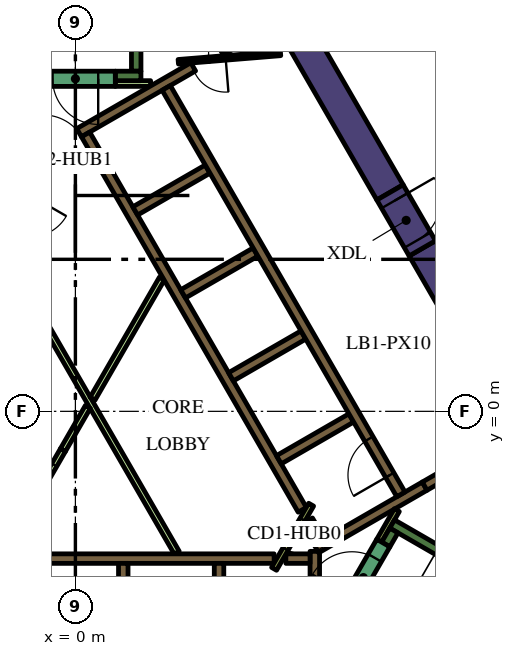
"""IFC4 building model, lengths in metres.
Left out: names, types, materials, properties, quantities, classifications, styles, units other than length and angle.
Written with IfcOpenShell. Run it as: python <this file> out.ifc"""

import sys

from ifc_helpers import new_model, si_unit, direction, frame, frame_2d, origin, place, context, subcontext, project, spatial, rectangle, extrude, element, fill, save


model = new_model("IFC4")
c1 = context("Model", 3, precision=1e-05, world=origin(), true_north=direction((0.0, 1.0)))
c2 = subcontext(c1, "Body", "Model", "MODEL_VIEW")
j1 = project(units=[si_unit("LENGTHUNIT", "METRE"), si_unit("PLANEANGLEUNIT", "RADIAN")], contexts=[c1])
p1 = place(None, origin())
s1 = spatial("IfcSite", under=j1, at=p1, CompositionType="ELEMENT")
p2 = place(p1, origin())
s2 = spatial("IfcBuilding", under=s1, at=p2, CompositionType="ELEMENT")
p3 = place(p2, frame((0.0, 0.0, 192.0)))
s3 = spatial("IfcBuildingStorey", under=s2, at=p3, CompositionType="ELEMENT", Elevation=192.0)
p4 = place(p3, frame((9.129, 4.289, 0.0), z_axis=(0.0, 0.0, 1.0), x_axis=(0.499995742806, -0.866027861663, 0.0)))
e1 = element("IfcWall", 1, at=p4, inside=s3, PredefinedType="SOLIDWALL", context=c2, shape_type="SweptSolid", body=[
    extrude(rectangle(XDim=12.527, YDim=0.8, at=frame_2d((6.264, 0.0))), origin(), (0.0, 0.0, 1.0), 4.2),
])
p5 = place(p3, frame((8.279, 5.761, 0.0), z_axis=(0.0, 0.0, 1.0), x_axis=(-0.500010359015, 0.866019422922, 0.0)))
e2 = element("IfcWall", 2, at=p5, inside=s3, PredefinedType="SOLIDWALL", context=c2, shape_type="SweptSolid", body=[
    extrude(rectangle(XDim=12.528, YDim=0.8, at=frame_2d((6.264, 0.0))), origin(), (0.0, 0.0, 1.0), 4.2),
])
p6 = place(p3, frame((8.334, -2.964, 0.0), z_axis=(0.0, 0.0, 1.0), x_axis=(0.866016039709, -0.500016218704, 0.0)))
e3 = element("IfcWall", 3, at=p6, inside=s3, PredefinedType="SOLIDWALL", context=c2, shape_type="SweptSolid", body=[
    extrude(rectangle(XDim=7.05, YDim=0.25, at=frame_2d((3.525, 0.0))), origin(), (0.0, 0.0, 1.0), 4.2),
])
p7 = place(p3, frame((8.168, -3.503, 0.0), z_axis=(0.0, 0.0, 1.0), x_axis=(0.49972245349, 0.866185586049, 0.0)))
e4 = element("IfcWall", 4, at=p7, inside=s3, PredefinedType="SOLIDWALL", context=c2, shape_type="SweptSolid", body=[
    extrude(rectangle(XDim=0.425, YDim=0.25, at=frame_2d((0.212, 0.0))), origin(), (0.0, 0.0, 1.0), 4.2),
])
p8 = place(p3, frame((1.6, 8.95, 0.0), z_axis=(0.0, 0.0, 1.0), x_axis=(0.0, 1.0, 0.0)))
e5 = element("IfcWall", 5, at=p8, inside=s3, PredefinedType="SOLIDWALL", context=c2, shape_type="SweptSolid", body=[
    extrude(rectangle(XDim=6.8, YDim=0.25, at=frame_2d((3.4, 0.0))), origin(), (0.0, 0.0, 1.0), 4.2),
])
p9 = place(p3, frame((1.05, 8.825, 0.0), z_axis=(0.0, 0.0, 1.0), x_axis=(1.0, 0.0, 0.0)))
e6 = element("IfcWall", 6, at=p9, inside=s3, PredefinedType="SOLIDWALL", context=c2, shape_type="SweptSolid", body=[
    extrude(rectangle(XDim=0.675, YDim=0.25, at=frame_2d((0.337, 0.0))), origin(), (0.0, 0.0, 1.0), 4.2),
])
p10 = place(p3, frame((-5.259, -3.875, 0.0), z_axis=(0.0, 0.0, 1.0), x_axis=(1.0, 0.0, 0.0)))
e7 = element("IfcWall", 7, at=p10, inside=s3, PredefinedType="SOLIDWALL", context=c2, shape_type="SweptSolid", body=[
    extrude(rectangle(XDim=10.489, YDim=0.25, at=frame_2d((5.244, 0.0))), origin(), (0.0, 0.0, 1.0), 4.2),
])
for number, where, z_axis, x_axis in (
    (8, (3.78, -4.0, 0.0), (0.0, 0.0, 1.0), (0.0, -1.0, 0.0)),
    (9, (1.26, -4.0, 0.0), (0.0, 0.0, 1.0), (0.0, -1.0, 0.0)),
):
    element("IfcWall", number, at=place(p3, frame(where, z_axis=z_axis, x_axis=x_axis)), inside=s3, PredefinedType="SOLIDWALL", context=c2, shape_type="SweptSolid", body=[
        extrude(rectangle(XDim=2.2, YDim=0.25, at=frame_2d((1.1, 0.0))), origin(), (0.0, 0.0, 1.0), 4.2),
    ])
p11 = place(p3, frame((6.3, -7.24, 0.0), z_axis=(0.0, 0.0, 1.0), x_axis=(0.0, 1.0, 0.0)))
e10 = element("IfcWall", 10, at=p11, inside=s3, PredefinedType="SOLIDWALL", context=c2, shape_type="SweptSolid", body=[
    extrude(rectangle(XDim=3.556, YDim=0.25, at=frame_2d((1.778, 0.0))), origin(), (0.0, 0.0, 1.0), 4.2),
])
p12 = place(p3, frame((5.538, -3.875, 0.0), z_axis=(0.0, 0.0, 1.0), x_axis=(1.0, 0.0, 0.0)))
e11 = element("IfcWall", 11, at=p12, inside=s3, PredefinedType="SOLIDWALL", context=c2, shape_type="SweptSolid", body=[
    extrude(rectangle(XDim=0.637, YDim=0.25, at=frame_2d((0.318, 0.0))), origin(), (0.0, 0.0, 1.0), 4.2),
])
p13 = place(p3, frame((9.19, -1.969, 0.0), z_axis=(0.0, 0.0, 1.0), x_axis=(-0.866057109641, -0.499945079824, 0.0)))
e12 = element("IfcWall", 12, at=p13, inside=s3, PredefinedType="SOLIDWALL", context=c2, shape_type="SweptSolid", body=[
    extrude(rectangle(XDim=3.291, YDim=0.25, at=frame_2d((1.646, 0.0))), origin(), (0.0, 0.0, 1.0), 4.2),
])
p14 = place(p3, frame((6.13, -2.867, 0.0), z_axis=(0.0, 0.0, 1.0), x_axis=(0.500160776593, -0.865932559475, 0.0)))
e13 = element("IfcWall", 13, at=p14, inside=s3, PredefinedType="SOLIDWALL", context=c2, shape_type="SweptSolid", body=[
    extrude(rectangle(XDim=0.627, YDim=0.25, at=frame_2d((0.313, 0.0))), origin(), (0.0, 0.0, 1.0), 4.2),
])
p15 = place(p3, frame((3.1, 9.064, 0.0), z_axis=(0.0, 0.0, 1.0), x_axis=(-0.866033137035, -0.499986605379, 0.0)))
e14 = element("IfcWall", 14, at=p15, inside=s3, PredefinedType="SOLIDWALL", context=c2, shape_type="SweptSolid", body=[
    extrude(rectangle(XDim=3.467, YDim=0.25, at=frame_2d((1.733, 0.0))), origin(), (0.0, 0.0, 1.0), 4.2),
])
p16 = place(p3, frame((0.268, 7.285, 0.0), z_axis=(0.0, 0.0, 1.0), x_axis=(0.500098681536, -0.865968422476, 0.0)))
e15 = element("IfcWall", 15, at=p16, inside=s3, PredefinedType="SOLIDWALL", context=c2, shape_type="SweptSolid", body=[
    extrude(rectangle(XDim=0.636, YDim=0.25, at=frame_2d((0.318, 0.0))), origin(), (0.0, 0.0, 1.0), 4.2),
])
p17 = place(p3, frame((5.97, -2.591, 0.0), z_axis=(0.0, 0.0, 1.0), x_axis=(-0.499994469932, 0.866028596547, 0.0)))
e16 = element("IfcWall", 16, at=p17, inside=s3, PredefinedType="SOLIDWALL", context=c2, shape_type="SweptSolid", body=[
    extrude(rectangle(XDim=10.488, YDim=0.25, at=frame_2d((5.244, 0.0))), origin(), (0.0, 0.0, 1.0), 4.2),
])
p18 = place(p3, frame((1.574, 5.274, 0.0), z_axis=(0.0, 0.0, 1.0), x_axis=(0.866028486751, 0.499994660107, 0.0)))
e17 = element("IfcWall", 17, at=p18, inside=s3, PredefinedType="SOLIDWALL", context=c2, shape_type="SweptSolid", body=[
    extrude(rectangle(XDim=2.2, YDim=0.25, at=frame_2d((1.1, 0.0))), origin(), (0.0, 0.0, 1.0), 4.2),
])
for number, where, z_axis, x_axis in (
    (18, (2.834, 3.091, 0.0), (0.0, 0.0, 1.0), (0.866, 0.5, 0.0)),
    (19, (4.094, 0.909, 0.0), (0.0, 0.0, 1.0), (0.866, 0.5, 0.0)),
    (20, (5.354, -1.274, 0.0), (0.0, 0.0, 1.0), (0.866, 0.5, 0.0)),
):
    element("IfcWall", number, at=place(p3, frame(where, z_axis=z_axis, x_axis=x_axis)), inside=s3, PredefinedType="SOLIDWALL", context=c2, shape_type="SweptSolid", body=[
        extrude(rectangle(XDim=2.2, YDim=0.25, at=frame_2d((1.1, 0.0))), origin(), (0.0, 0.0, 1.0), 4.2),
    ])
p19 = place(p3, frame((3.83, 9.486, 0.0), z_axis=(0.0, 0.0, 1.0), x_axis=(0.865986202621, 0.500067892261, 0.0)))
e21 = element("IfcWall", 21, at=p19, inside=s3, PredefinedType="SOLIDWALL", context=c2, shape_type="SweptSolid", body=[
    extrude(rectangle(XDim=1.591, YDim=0.25, at=frame_2d((0.795, 0.0))), origin(), (0.0, 0.0, 1.0), 4.2),
])
p20 = place(p3, frame((1.05, 8.625, 0.0), z_axis=(0.0, 0.0, 1.0), x_axis=(1.0, 0.0, 0.0)))
e22 = element("IfcWall", 22, at=p20, inside=s3, PredefinedType="PARTITIONING", context=c2, shape_type="SweptSolid", body=[
    extrude(rectangle(XDim=0.929, YDim=0.15, at=frame_2d((0.464, 0.0))), origin(), (0.0, 0.0, 1.0), 3.1),
])
p21 = place(p3, frame((8.459, -2.599, 0.0), z_axis=(0.0, 0.0, 1.0), x_axis=(-0.500041054325, -0.866001699761, 0.0)))
e23 = element("IfcWall", 23, at=p21, inside=s3, PredefinedType="PARTITIONING", context=c2, shape_type="SweptSolid", body=[
    extrude(rectangle(XDim=0.929, YDim=0.15, at=frame_2d((0.464, 0.0))), origin(), (0.0, 0.0, 1.0), 4.2),
])
p22 = place(p3, frame((-1.887, 4.168, 0.0), z_axis=(0.0, 0.0, 1.0), x_axis=(0.499997069472, -0.866027095719, 0.0)))
e24 = element("IfcWall", 24, at=p22, inside=s3, PredefinedType="PARTITIONING", context=c2, shape_type="SweptSolid", body=[
    extrude(rectangle(XDim=9.106, YDim=0.15, at=frame_2d((4.553, 0.0))), origin(), (0.0, 0.0, 1.0), 3.1),
])
p23 = place(p3, frame((-0.329, -1.021, 0.0), z_axis=(0.0, 0.0, 1.0), x_axis=(0.500033191285, 0.866006239939, 0.0)))
e25 = element("IfcWall", 25, at=p23, inside=s3, PredefinedType="PARTITIONING", context=c2, shape_type="SweptSolid", body=[
    extrude(rectangle(XDim=1.315, YDim=0.15, at=frame_2d((0.657, 0.0))), origin(), (0.0, 0.0, 1.0), 3.1),
])
p24 = place(p3, frame((2.277, 3.493, 0.0), z_axis=(0.0, 0.0, 1.0), x_axis=(-0.499994550825, -0.866028549844, 0.0)))
e26 = element("IfcWall", 26, at=p24, inside=s3, PredefinedType="PARTITIONING", context=c2, shape_type="SweptSolid", body=[
    extrude(rectangle(XDim=3.65, YDim=0.15, at=frame_2d((1.825, 0.0))), origin(), (0.0, 0.0, 1.0), 3.1),
])
p25 = place(p3, frame((8.565, -2.185, 0.0), z_axis=(0.0, 0.0, 1.0), x_axis=(-0.499997954832, 0.866026584559, 0.0)))
e27 = element("IfcWall", 27, at=p25, inside=s3, PredefinedType="SOLIDWALL", context=c2, shape_type="SweptSolid", body=[
    extrude(rectangle(XDim=12.35, YDim=0.25, at=frame_2d((6.175, 0.0))), origin(), (0.0, 0.0, 1.0), 4.2),
])
p26 = place(p25, frame((0.585, 0.0, 0.0)))
e28 = element("IfcOpeningElement", 28, at=p26, cuts=e27, PredefinedType="OPENING", context=c2, shape_type="SweptSolid", body=[
    extrude(rectangle(XDim=1.1, YDim=2.1, at=frame_2d((0.55, 1.05))), frame((0.0, 0.135, 0.0), z_axis=(0.0, -1.0, 0.0), x_axis=(1.0, 0.0, 0.0)), (0.0, 0.0, 1.0), 0.27),
])
p27 = place(p3, frame((7.053, -5.284, 0.0), z_axis=(0.0, 0.0, 1.0), x_axis=(0.500078061341, 0.865980330357, 0.0)))
e29 = element("IfcWall", 29, at=p27, inside=s3, PredefinedType="SOLIDWALL", context=c2, shape_type="SweptSolid", body=[
    extrude(rectangle(XDim=2.1, YDim=0.4, at=frame_2d((1.05, 0.0))), origin(), (0.0, 0.0, 1.0), 4.2),
])
p28 = place(p27, frame((0.45, 0.0, 0.0)))
e30 = element("IfcOpeningElement", 30, at=p28, cuts=e29, PredefinedType="OPENING", context=c2, shape_type="SweptSolid", body=[
    extrude(rectangle(XDim=1.2, YDim=2.1, at=frame_2d((0.6, 1.05))), frame((0.0, 0.21, 0.0), z_axis=(0.0, -1.0, 0.0), x_axis=(1.0, 0.0, 0.0)), (0.0, 0.0, 1.0), 0.42),
])
p29 = place(p3, frame((1.05, 8.75, 0.0), z_axis=(0.0, 0.0, 1.0), x_axis=(-1.0, 0.0, 0.0)))
e31 = element("IfcWall", 31, at=p29, inside=s3, PredefinedType="SOLIDWALL", context=c2, shape_type="SweptSolid", body=[
    extrude(rectangle(XDim=2.1, YDim=0.4, at=frame_2d((1.05, 0.0))), origin(), (0.0, 0.0, 1.0), 4.2),
])
p30 = place(p29, frame((0.45, 0.0, 0.0)))
e32 = element("IfcOpeningElement", 32, at=p30, cuts=e31, PredefinedType="OPENING", context=c2, shape_type="SweptSolid", body=[
    extrude(rectangle(XDim=1.2, YDim=2.1, at=frame_2d((0.6, 1.05))), frame((0.0, 0.21, 0.0), z_axis=(0.0, -1.0, 0.0), x_axis=(1.0, 0.0, 0.0)), (0.0, 0.0, 1.0), 0.42),
])
p31 = place(p3, frame((5.398, 9.419, 0.0), z_axis=(0.0, 0.0, 1.0), x_axis=(-0.996653416376, -0.081743303248, 0.0)))
e33 = element("IfcWall", 33, at=p31, inside=s3, PredefinedType="PARTITIONING", context=c2, shape_type="SweptSolid", body=[
    extrude(rectangle(XDim=2.7, YDim=0.12, at=frame_2d((1.35, 0.0))), origin(), (0.0, 0.0, 1.0), 3.1),
])
p32 = place(p31, frame((1.45, 0.0, 0.0)))
e34 = element("IfcOpeningElement", 34, at=p32, cuts=e33, PredefinedType="OPENING", context=c2, shape_type="SweptSolid", body=[
    extrude(rectangle(XDim=0.9, YDim=2.1, at=frame_2d((0.45, 1.05))), frame((0.0, 0.07, 0.0), z_axis=(0.0, -1.0, 0.0), x_axis=(1.0, 0.0, 0.0)), (0.0, 0.0, 1.0), 0.14),
])
p33 = place(p3, frame((6.203, -2.456, 0.0), z_axis=(0.0, 0.0, 1.0), x_axis=(-0.500043961785, -0.866000020948, 0.0)))
e35 = element("IfcWall", 35, at=p33, inside=s3, PredefinedType="PARTITIONING", context=c2, shape_type="SweptSolid", body=[
    extrude(rectangle(XDim=1.95, YDim=0.15, at=frame_2d((0.975, 0.0))), origin(), (0.0, 0.0, 1.0), 4.2),
])
p34 = place(p33, frame((0.45, 0.0, 0.0)))
e36 = element("IfcOpeningElement", 36, at=p34, cuts=e35, PredefinedType="OPENING", context=c2, shape_type="SweptSolid", body=[
    extrude(rectangle(XDim=0.9, YDim=2.1, at=frame_2d((0.45, 1.05))), frame((0.0, 0.085, 0.0), z_axis=(0.0, -1.0, 0.0), x_axis=(1.0, 0.0, 0.0)), (0.0, 0.0, 1.0), 0.17),
])
p35 = place(p3, frame((-1.303, 6.6, 0.0), z_axis=(0.0, 0.0, 1.0), x_axis=(1.0, 0.0, 0.0)))
e37 = element("IfcWall", 37, at=p35, inside=s3, PredefinedType="PARTITIONING", context=c2, shape_type="SweptSolid", body=[
    extrude(rectangle(XDim=2.1, YDim=0.15, at=frame_2d((1.05, 0.0))), origin(), (0.0, 0.0, 1.0), 4.2),
])
p36 = place(p35, frame((0.45, 0.0, 0.0)))
e38 = element("IfcOpeningElement", 38, at=p36, cuts=e37, PredefinedType="OPENING", context=c2, shape_type="SweptSolid", body=[
    extrude(rectangle(XDim=1.2, YDim=2.1, at=frame_2d((0.6, 1.05))), frame((0.0, 0.085, 0.0), z_axis=(0.0, -1.0, 0.0), x_axis=(1.0, 0.0, 0.0)), (0.0, 0.0, 1.0), 0.17),
])
p37 = place(p3, frame((11.009, -0.919, 0.0), z_axis=(0.0, 0.0, 1.0), x_axis=(-0.866059744384, -0.49994051562, 0.0)))
e39 = element("IfcWall", 39, at=p37, inside=s3, PredefinedType="SOLIDWALL", context=c2, shape_type="SweptSolid", body=[
    extrude(rectangle(XDim=2.1, YDim=0.25, at=frame_2d((1.05, 0.0))), origin(), (0.0, 0.0, 1.0), 4.2),
])
p38 = place(p37, frame((0.45, 0.0, 0.0)))
e40 = element("IfcOpeningElement", 40, at=p38, cuts=e39, PredefinedType="OPENING", context=c2, shape_type="SweptSolid", body=[
    extrude(rectangle(XDim=1.2, YDim=2.1, at=frame_2d((0.6, 1.05))), frame((0.0, 0.135, 0.0), z_axis=(0.0, -1.0, 0.0), x_axis=(1.0, 0.0, 0.0)), (0.0, 0.0, 1.0), 0.27),
])
p39 = place(p3, frame((8.279, 5.761, 0.0), z_axis=(0.0, 0.0, 1.0), x_axis=(0.500062241894, -0.865989465428, 0.0)))
e41 = element("IfcWall", 41, at=p39, inside=s3, PredefinedType="SOLIDWALL", context=c2, shape_type="SweptSolid", body=[
    extrude(rectangle(XDim=1.7, YDim=0.8, at=frame_2d((0.85, 0.0))), origin(), (0.0, 0.0, 1.0), 4.2),
])
p40 = place(p39, frame((0.25, 0.0, 0.0)))
e42 = element("IfcOpeningElement", 42, at=p40, cuts=e41, PredefinedType="OPENING", context=c2, shape_type="SweptSolid", body=[
    extrude(rectangle(XDim=1.2, YDim=2.1, at=frame_2d((0.6, 1.05))), frame((0.0, 0.41, 0.0), z_axis=(0.0, -1.0, 0.0), x_axis=(1.0, 0.0, 0.0)), (0.0, 0.0, 1.0), 0.82),
])
p41 = place(p3, frame((-1.229, -2.579, 0.0), z_axis=(0.0, 0.0, 1.0), x_axis=(0.500062916607, 0.865989075817, 0.0)))
e43 = element("IfcWall", 43, at=p41, inside=s3, PredefinedType="PARTITIONING", context=c2, shape_type="SweptSolid", body=[
    extrude(rectangle(XDim=1.8, YDim=0.15, at=frame_2d((0.9, 0.0))), origin(), (0.0, 0.0, 1.0), 3.1),
])
p42 = place(p41, frame((0.45, 0.0, 0.0)))
e44 = element("IfcOpeningElement", 44, at=p42, cuts=e43, PredefinedType="OPENING", context=c2, shape_type="SweptSolid", body=[
    extrude(rectangle(XDim=0.9, YDim=2.1, at=frame_2d((0.45, 1.05))), frame((0.0, 0.085, 0.0), z_axis=(0.0, -1.0, 0.0), x_axis=(1.0, 0.0, 0.0)), (0.0, 0.0, 1.0), 0.17),
])
p43 = place(p3, frame((15.499, 2.055, 0.0), z_axis=(0.0, 0.0, 1.0), x_axis=(-0.499986694938, 0.866033085329, 0.0)))
e45 = element("IfcWall", 45, at=p43, inside=s3, PredefinedType="PARTITIONING", context=c2, shape_type="SweptSolid", body=[
    extrude(rectangle(XDim=11.97, YDim=0.2, at=frame_2d((5.985, 0.0))), origin(), (0.0, 0.0, 1.0), 3.1),
])
p44 = place(p43, frame((5.5, 0.0, 0.0)))
e46 = element("IfcOpeningElement", 46, at=p44, cuts=e45, PredefinedType="OPENING", context=c2, shape_type="SweptSolid", body=[
    extrude(rectangle(XDim=1.0, YDim=2.1, at=frame_2d((0.5, 1.05))), frame((0.0, 0.11, 0.0), z_axis=(0.0, -1.0, 0.0), x_axis=(1.0, 0.0, 0.0)), (0.0, 0.0, 1.0), 0.22),
])
p45 = place(p26, origin())
e47 = element("IfcDoor", 47, at=p45, inside=s3, OperationType="DOUBLE_DOOR_SLIDING", PredefinedType="DOOR", context=c2, shape_type="SweptSolid", body=[
    extrude(rectangle(XDim=1.1, YDim=2.1, at=frame_2d((0.55, 1.05))), frame((0.0, 0.025, 0.0), z_axis=(0.0, -1.0, 0.0), x_axis=(1.0, 0.0, 0.0)), (0.0, 0.0, 1.0), 0.05),
])
fill(e28, e47)
p46 = place(p28, origin())
e48 = element("IfcDoor", 48, at=p46, inside=s3, OperationType="SINGLE_SWING_LEFT", PredefinedType="DOOR", context=c2, shape_type="SweptSolid", body=[
    extrude(rectangle(XDim=1.2, YDim=2.1, at=frame_2d((0.6, 1.05))), frame((0.0, 0.025, 0.0), z_axis=(0.0, -1.0, 0.0), x_axis=(1.0, 0.0, 0.0)), (0.0, 0.0, 1.0), 0.05),
])
fill(e30, e48)
p47 = place(p30, origin())
e49 = element("IfcDoor", 49, at=p47, inside=s3, OperationType="SINGLE_SWING_LEFT", PredefinedType="DOOR", context=c2, shape_type="SweptSolid", body=[
    extrude(rectangle(XDim=1.2, YDim=2.1, at=frame_2d((0.6, 1.05))), frame((0.0, 0.025, 0.0), z_axis=(0.0, -1.0, 0.0), x_axis=(1.0, 0.0, 0.0)), (0.0, 0.0, 1.0), 0.05),
])
fill(e32, e49)
p48 = place(p32, origin())
e50 = element("IfcDoor", 50, at=p48, inside=s3, OperationType="SINGLE_SWING_LEFT", PredefinedType="DOOR", context=c2, shape_type="SweptSolid", body=[
    extrude(rectangle(XDim=0.9, YDim=2.1, at=frame_2d((0.45, 1.05))), frame((0.0, 0.025, 0.0), z_axis=(0.0, -1.0, 0.0), x_axis=(1.0, 0.0, 0.0)), (0.0, 0.0, 1.0), 0.05),
])
fill(e34, e50)
p49 = place(p34, origin())
e51 = element("IfcDoor", 51, at=p49, inside=s3, OperationType="SINGLE_SWING_LEFT", PredefinedType="DOOR", context=c2, shape_type="SweptSolid", body=[
    extrude(rectangle(XDim=0.9, YDim=2.1, at=frame_2d((0.45, 1.05))), frame((0.0, 0.025, 0.0), z_axis=(0.0, -1.0, 0.0), x_axis=(1.0, 0.0, 0.0)), (0.0, 0.0, 1.0), 0.05),
])
fill(e36, e51)
p50 = place(p36, origin())
e52 = element("IfcDoor", 52, at=p50, inside=s3, OperationType="SINGLE_SWING_LEFT", PredefinedType="DOOR", context=c2, shape_type="SweptSolid", body=[
    extrude(rectangle(XDim=1.2, YDim=2.1, at=frame_2d((0.6, 1.05))), frame((0.0, 0.025, 0.0), z_axis=(0.0, -1.0, 0.0), x_axis=(1.0, 0.0, 0.0)), (0.0, 0.0, 1.0), 0.05),
])
fill(e38, e52)
p51 = place(p40, origin())
e53 = element("IfcDoor", 53, at=p51, inside=s3, OperationType="SINGLE_SWING_LEFT", PredefinedType="DOOR", context=c2, shape_type="SweptSolid", body=[
    extrude(rectangle(XDim=1.2, YDim=2.1, at=frame_2d((0.6, 1.05))), frame((0.0, 0.025, 0.0), z_axis=(0.0, -1.0, 0.0), x_axis=(1.0, 0.0, 0.0)), (0.0, 0.0, 1.0), 0.05),
])
fill(e42, e53)
p52 = place(p42, origin())
e54 = element("IfcDoor", 54, at=p52, inside=s3, OperationType="SINGLE_SWING_LEFT", PredefinedType="DOOR", context=c2, shape_type="SweptSolid", body=[
    extrude(rectangle(XDim=0.9, YDim=2.1, at=frame_2d((0.45, 1.05))), frame((0.0, 0.025, 0.0), z_axis=(0.0, -1.0, 0.0), x_axis=(1.0, 0.0, 0.0)), (0.0, 0.0, 1.0), 0.05),
])
fill(e44, e54)
save(model, sys.argv[1])
